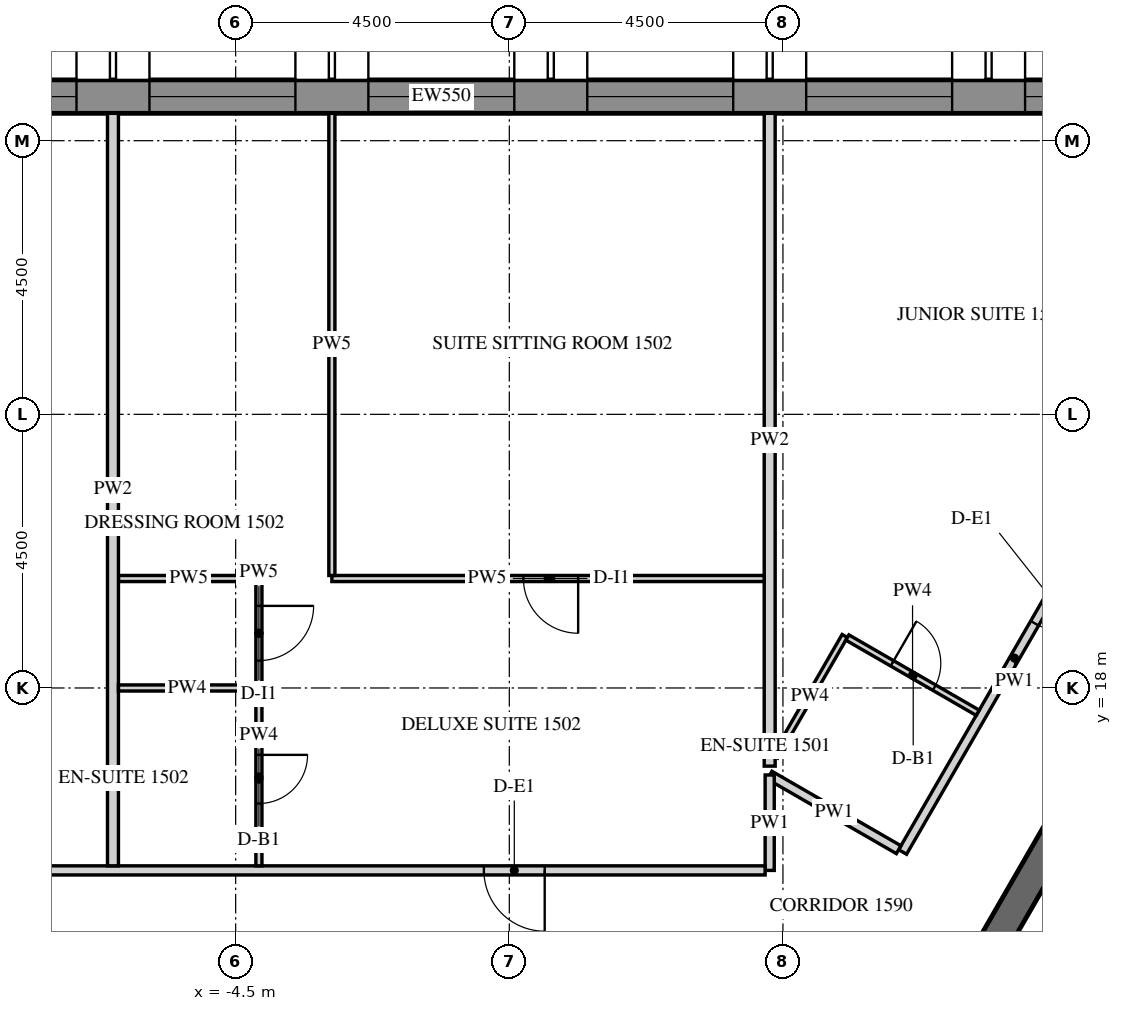
"""IFC4 building model, lengths in metres.
Left out: names, types, materials, properties, quantities, classifications, styles, units other than length and angle.
Written with IfcOpenShell. Run it as: python <this file> out.ifc"""

import sys

from ifc_helpers import new_model, si_unit, direction, frame, frame_2d, origin, place, context, subcontext, project, spatial, polyline, rectangle, outline, extrude, element, fill, save


model = new_model("IFC4")
c1 = context("Model", 3, precision=1e-05, world=origin(), true_north=direction((0.0, 1.0)))
c2 = subcontext(c1, "Body", "Model", "MODEL_VIEW")
j1 = project(units=[si_unit("LENGTHUNIT", "METRE"), si_unit("PLANEANGLEUNIT", "RADIAN")], contexts=[c1])
p1 = place(None, origin())
s1 = spatial("IfcSite", under=j1, at=p1, CompositionType="ELEMENT")
p2 = place(p1, origin())
s2 = spatial("IfcBuilding", under=s1, at=p2, CompositionType="ELEMENT")
p3 = place(p2, frame((0.0, 0.0, 195.6)))
s3 = spatial("IfcBuildingStorey", under=s2, at=p3, CompositionType="ELEMENT", Elevation=195.6)
p4 = place(p3, frame((12.761, 27.725, -0.15), z_axis=(0.0, 0.0, 1.0), x_axis=(-1.0, 0.0, 0.0)))
e1 = element("IfcWall", 1, at=p4, inside=s3, PredefinedType="SOLIDWALL", context=c2, shape_type="SweptSolid", body=[
    extrude(outline(polyline([(-0.022, -0.275), (27.783, -0.275), (27.732, 0.275), (0.022, 0.275), (-0.022, -0.275)])), origin(), (0.0, 0.0, 1.0), 3.9),
])
p5 = place(p4, frame((1.879, 0.0, 1.05)))
e2 = element("IfcOpeningElement", 2, at=p5, cuts=e1, PredefinedType="OPENING", context=c2, shape_type="SweptSolid", body=[
    extrude(rectangle(XDim=2.4, YDim=2.4, at=frame_2d((1.2, 1.2))), frame((0.0, 0.285, 0.0), z_axis=(0.0, -1.0, 0.0), x_axis=(1.0, 0.0, 0.0)), (0.0, 0.0, 1.0), 0.57),
])
p6 = place(p4, frame((5.479, 0.0, 1.05)))
e3 = element("IfcOpeningElement", 3, at=p6, cuts=e1, PredefinedType="OPENING", context=c2, shape_type="SweptSolid", body=[
    extrude(rectangle(XDim=2.4, YDim=2.4, at=frame_2d((1.2, 1.2))), frame((0.0, 0.285, 0.0), z_axis=(0.0, -1.0, 0.0), x_axis=(1.0, 0.0, 0.0)), (0.0, 0.0, 1.0), 0.57),
])
p7 = place(p4, frame((9.079, 0.0, 1.05)))
e4 = element("IfcOpeningElement", 4, at=p7, cuts=e1, PredefinedType="OPENING", context=c2, shape_type="SweptSolid", body=[
    extrude(rectangle(XDim=2.4, YDim=2.4, at=frame_2d((1.2, 1.2))), frame((0.0, 0.285, 0.0), z_axis=(0.0, -1.0, 0.0), x_axis=(1.0, 0.0, 0.0)), (0.0, 0.0, 1.0), 0.57),
])
p8 = place(p4, frame((12.679, 0.0, 1.05)))
e5 = element("IfcOpeningElement", 5, at=p8, cuts=e1, PredefinedType="OPENING", context=c2, shape_type="SweptSolid", body=[
    extrude(rectangle(XDim=2.4, YDim=2.4, at=frame_2d((1.2, 1.2))), frame((0.0, 0.285, 0.0), z_axis=(0.0, -1.0, 0.0), x_axis=(1.0, 0.0, 0.0)), (0.0, 0.0, 1.0), 0.57),
])
p9 = place(p4, frame((16.279, 0.0, 1.05)))
e6 = element("IfcOpeningElement", 6, at=p9, cuts=e1, PredefinedType="OPENING", context=c2, shape_type="SweptSolid", body=[
    extrude(rectangle(XDim=2.4, YDim=2.4, at=frame_2d((1.2, 1.2))), frame((0.0, 0.285, 0.0), z_axis=(0.0, -1.0, 0.0), x_axis=(1.0, 0.0, 0.0)), (0.0, 0.0, 1.0), 0.57),
])
p10 = place(p4, frame((19.879, 0.0, 1.05)))
e7 = element("IfcOpeningElement", 7, at=p10, cuts=e1, PredefinedType="OPENING", context=c2, shape_type="SweptSolid", body=[
    extrude(rectangle(XDim=2.4, YDim=2.4, at=frame_2d((1.2, 1.2))), frame((0.0, 0.285, 0.0), z_axis=(0.0, -1.0, 0.0), x_axis=(1.0, 0.0, 0.0)), (0.0, 0.0, 1.0), 0.57),
])
p11 = place(p4, frame((23.479, 0.0, 1.05)))
e8 = element("IfcOpeningElement", 8, at=p11, cuts=e1, PredefinedType="OPENING", context=c2, shape_type="SweptSolid", body=[
    extrude(rectangle(XDim=2.4, YDim=2.4, at=frame_2d((1.2, 1.2))), frame((0.0, 0.285, 0.0), z_axis=(0.0, -1.0, 0.0), x_axis=(1.0, 0.0, 0.0)), (0.0, 0.0, 1.0), 0.57),
])
p12 = place(p3, frame((7.506, 13.0, -0.15), z_axis=(0.0, 0.0, 1.0), x_axis=(0.499988271576, 0.866032175087, 0.0)))
e9 = element("IfcWall", 9, at=p12, inside=s3, PredefinedType="SHEAR", context=c2, shape_type="SweptSolid", body=[
    extrude(rectangle(XDim=15.424, YDim=0.5, at=frame_2d((7.712, 0.0))), origin(), (0.0, 0.0, 1.0), 3.9),
])
p13 = place(p12, frame((6.812, 0.0, 0.15)))
e10 = element("IfcOpeningElement", 10, at=p13, cuts=e9, PredefinedType="OPENING", context=c2, shape_type="SweptSolid", body=[
    extrude(rectangle(XDim=1.8, YDim=2.4, at=frame_2d((0.9, 1.2))), frame((0.0, 0.26, 0.0), z_axis=(0.0, -1.0, 0.0), x_axis=(1.0, 0.0, 0.0)), (0.0, 0.0, 1.0), 0.52),
])
p14 = place(p3, frame((10.149, 21.678, 0.0), z_axis=(0.0, 0.0, 1.0), x_axis=(-0.500020076982, -0.866013812023, 0.0)))
e11 = element("IfcWall", 11, at=p14, inside=s3, PredefinedType="PARTITIONING", context=c2, shape_type="SweptSolid", body=[
    extrude(rectangle(XDim=7.361, YDim=0.15, at=frame_2d((3.681, 0.0))), origin(), (0.0, 0.0, 1.0), 2.988),
])
p15 = place(p14, frame((2.018, 0.0, 0.0)))
e12 = element("IfcOpeningElement", 12, at=p15, cuts=e11, PredefinedType="OPENING", context=c2, shape_type="SweptSolid", body=[
    extrude(rectangle(XDim=1.0, YDim=2.1, at=frame_2d((0.5, 1.05))), frame((0.0, 0.085, 0.0), z_axis=(0.0, -1.0, 0.0), x_axis=(1.0, 0.0, 0.0)), (0.0, 0.0, 1.0), 0.17),
])
p16 = place(p3, frame((6.403, 15.341, 0.0), z_axis=(0.0, 0.0, 1.0), x_axis=(-0.8660013066, 0.500041735226, 0.0)))
e13 = element("IfcWall", 13, at=p16, inside=s3, PredefinedType="PARTITIONING", context=c2, shape_type="SweptSolid", body=[
    extrude(rectangle(XDim=2.449, YDim=0.15, at=frame_2d((1.225, 0.0))), origin(), (0.0, 0.0, 1.0), 2.988),
])
p17 = place(p3, frame((4.282, 16.569, 0.0), z_axis=(0.0, 0.0, 1.0), x_axis=(0.0, -1.0, 0.0)))
e14 = element("IfcWall", 14, at=p17, inside=s3, PredefinedType="PARTITIONING", context=c2, shape_type="SweptSolid", body=[
    extrude(rectangle(XDim=1.569, YDim=0.15, at=frame_2d((0.785, 0.0))), origin(), (0.0, 0.0, 1.0), 2.988),
])
p18 = place(p3, frame((4.207, 15.0, 0.0), z_axis=(0.0, 0.0, 1.0), x_axis=(-1.0, 0.0, 0.0)))
e15 = element("IfcWall", 15, at=p18, inside=s3, PredefinedType="PARTITIONING", context=c2, shape_type="SweptSolid", body=[
    extrude(rectangle(XDim=12.867, YDim=0.15, at=frame_2d((6.434, 0.0))), origin(), (0.0, 0.0, 1.0), 2.988),
])
p19 = place(p18, frame((3.625, 0.0, 0.0)))
e16 = element("IfcOpeningElement", 16, at=p19, cuts=e15, PredefinedType="OPENING", context=c2, shape_type="SweptSolid", body=[
    extrude(rectangle(XDim=1.0, YDim=2.1, at=frame_2d((0.5, 1.05))), frame((0.0, 0.085, 0.0), z_axis=(0.0, -1.0, 0.0), x_axis=(1.0, 0.0, 0.0)), (0.0, 0.0, 1.0), 0.17),
])
p20 = place(p3, frame((4.372, 16.873, 0.0), z_axis=(0.0, 0.0, 1.0), x_axis=(0.500005641832, 0.866022146447, 0.0)))
e17 = element("IfcWall", 17, at=p20, inside=s3, PredefinedType="PARTITIONING", context=c2, shape_type="SweptSolid", body=[
    extrude(rectangle(XDim=2.289, YDim=0.1, at=frame_2d((1.144, 0.0))), origin(), (0.0, 0.0, 1.0), 2.988),
])
p21 = place(p3, frame((5.56, 18.83, 0.0), z_axis=(0.0, 0.0, 1.0), x_axis=(0.866006523861, -0.500032699561, 0.0)))
e18 = element("IfcWall", 18, at=p21, inside=s3, PredefinedType="PARTITIONING", context=c2, shape_type="SweptSolid", body=[
    extrude(rectangle(XDim=2.475, YDim=0.1, at=frame_2d((1.237, 0.0))), origin(), (0.0, 0.0, 1.0), 2.988),
])
p22 = place(p21, frame((0.85, 0.0, 0.0)))
e19 = element("IfcOpeningElement", 19, at=p22, cuts=e18, PredefinedType="OPENING", context=c2, shape_type="SweptSolid", body=[
    extrude(rectangle(XDim=0.8, YDim=2.1, at=frame_2d((0.4, 1.05))), frame((0.0, 0.06, 0.0), z_axis=(0.0, -1.0, 0.0), x_axis=(1.0, 0.0, 0.0)), (0.0, 0.0, 1.0), 0.12),
])
p23 = place(p3, frame((4.282, 27.45, 0.0), z_axis=(0.0, 0.0, 1.0), x_axis=(0.0, -1.0, 0.0)))
e20 = element("IfcWall", 20, at=p23, inside=s3, PredefinedType="PARTITIONING", context=c2, shape_type="SweptSolid", body=[
    extrude(rectangle(XDim=10.735, YDim=0.18, at=frame_2d((5.368, 0.0))), origin(), (0.0, 0.0, 1.0), 2.988),
])
p24 = place(p3, frame((-4.118, 18.0, 0.0), z_axis=(0.0, 0.0, 1.0), x_axis=(0.0, -1.0, 0.0)))
e21 = element("IfcWall", 21, at=p24, inside=s3, PredefinedType="PARTITIONING", context=c2, shape_type="SweptSolid", body=[
    extrude(rectangle(XDim=2.925, YDim=0.1, at=frame_2d((1.462, 0.0))), origin(), (0.0, 0.0, 1.0), 2.988),
])
p25 = place(p24, frame((1.1, 0.0, 0.0)))
e22 = element("IfcOpeningElement", 22, at=p25, cuts=e21, PredefinedType="OPENING", context=c2, shape_type="SweptSolid", body=[
    extrude(rectangle(XDim=0.8, YDim=2.1, at=frame_2d((0.4, 1.05))), frame((0.0, 0.06, 0.0), z_axis=(0.0, -1.0, 0.0), x_axis=(1.0, 0.0, 0.0)), (0.0, 0.0, 1.0), 0.12),
])
p26 = place(p3, frame((-6.428, 19.8, 0.0), z_axis=(0.0, 0.0, 1.0), x_axis=(1.0, 0.0, 0.0)))
e23 = element("IfcWall", 23, at=p26, inside=s3, PredefinedType="PARTITIONING", context=c2, shape_type="SweptSolid", body=[
    extrude(rectangle(XDim=2.31, YDim=0.1, at=frame_2d((1.155, 0.0))), origin(), (0.0, 0.0, 1.0), 2.988),
])
p27 = place(p3, frame((-4.118, 19.75, 0.0), z_axis=(0.0, 0.0, 1.0), x_axis=(0.0, -1.0, 0.0)))
e24 = element("IfcWall", 24, at=p27, inside=s3, PredefinedType="PARTITIONING", context=c2, shape_type="SweptSolid", body=[
    extrude(rectangle(XDim=1.7, YDim=0.1, at=frame_2d((0.85, 0.0))), origin(), (0.0, 0.0, 1.0), 2.988),
])
p28 = place(p27, frame((0.4, 0.0, 0.0)))
e25 = element("IfcOpeningElement", 25, at=p28, cuts=e24, PredefinedType="OPENING", context=c2, shape_type="SweptSolid", body=[
    extrude(rectangle(XDim=0.9, YDim=2.1, at=frame_2d((0.45, 1.05))), frame((0.0, 0.06, 0.0), z_axis=(0.0, -1.0, 0.0), x_axis=(1.0, 0.0, 0.0)), (0.0, 0.0, 1.0), 0.12),
])
p29 = place(p3, frame((4.192, 19.8, 0.0), z_axis=(0.0, 0.0, 1.0), x_axis=(-1.0, 0.0, 0.0)))
e26 = element("IfcWall", 26, at=p29, inside=s3, PredefinedType="PARTITIONING", context=c2, shape_type="SweptSolid", body=[
    extrude(rectangle(XDim=7.11, YDim=0.1, at=frame_2d((3.555, 0.0))), origin(), (0.0, 0.0, 1.0), 2.988),
])
p30 = place(p29, frame((3.06, 0.0, 0.0)))
e27 = element("IfcOpeningElement", 27, at=p30, cuts=e26, PredefinedType="OPENING", context=c2, shape_type="SweptSolid", body=[
    extrude(rectangle(XDim=0.9, YDim=2.1, at=frame_2d((0.45, 1.05))), frame((0.0, 0.06, 0.0), z_axis=(0.0, -1.0, 0.0), x_axis=(1.0, 0.0, 0.0)), (0.0, 0.0, 1.0), 0.12),
])
p31 = place(p3, frame((-2.918, 19.85, 0.0), z_axis=(0.0, 0.0, 1.0), x_axis=(0.0, 1.0, 0.0)))
e28 = element("IfcWall", 28, at=p31, inside=s3, PredefinedType="PARTITIONING", context=c2, shape_type="SweptSolid", body=[
    extrude(rectangle(XDim=7.6, YDim=0.1, at=frame_2d((3.8, 0.0))), origin(), (0.0, 0.0, 1.0), 2.988),
])
p32 = place(p3, frame((-6.518, 27.45, 0.0), z_axis=(0.0, 0.0, 1.0), x_axis=(0.0, -1.0, 0.0)))
e29 = element("IfcWall", 29, at=p32, inside=s3, PredefinedType="PARTITIONING", context=c2, shape_type="SweptSolid", body=[
    extrude(rectangle(XDim=12.375, YDim=0.18, at=frame_2d((6.188, 0.0))), origin(), (0.0, 0.0, 1.0), 2.988),
])
p33 = place(p3, frame((-4.168, 18.0, 0.0), z_axis=(0.0, 0.0, 1.0), x_axis=(-1.0, 0.0, 0.0)))
e30 = element("IfcWall", 30, at=p33, inside=s3, PredefinedType="PARTITIONING", context=c2, shape_type="SweptSolid", body=[
    extrude(rectangle(XDim=2.26, YDim=0.1, at=frame_2d((1.13, 0.0))), origin(), (0.0, 0.0, 1.0), 2.988),
])
p34 = place(p5, frame((0.0, 0.205, 0.0)))
e31 = element("IfcWindow", 31, at=p34, inside=s3, PartitioningType="DOUBLE_PANEL_VERTICAL", PredefinedType="WINDOW", context=c2, shape_type="SweptSolid", body=[
    extrude(rectangle(XDim=2.4, YDim=2.4, at=frame_2d((1.2, 1.2))), frame((0.0, 0.03, 0.0), z_axis=(0.0, -1.0, 0.0), x_axis=(1.0, 0.0, 0.0)), (0.0, 0.0, 1.0), 0.06),
])
fill(e2, e31)
p35 = place(p6, frame((0.0, 0.205, 0.0)))
e32 = element("IfcWindow", 32, at=p35, inside=s3, PartitioningType="DOUBLE_PANEL_VERTICAL", PredefinedType="WINDOW", context=c2, shape_type="SweptSolid", body=[
    extrude(rectangle(XDim=2.4, YDim=2.4, at=frame_2d((1.2, 1.2))), frame((0.0, 0.03, 0.0), z_axis=(0.0, -1.0, 0.0), x_axis=(1.0, 0.0, 0.0)), (0.0, 0.0, 1.0), 0.06),
])
fill(e3, e32)
p36 = place(p7, frame((0.0, 0.205, 0.0)))
e33 = element("IfcWindow", 33, at=p36, inside=s3, PartitioningType="DOUBLE_PANEL_VERTICAL", PredefinedType="WINDOW", context=c2, shape_type="SweptSolid", body=[
    extrude(rectangle(XDim=2.4, YDim=2.4, at=frame_2d((1.2, 1.2))), frame((0.0, 0.03, 0.0), z_axis=(0.0, -1.0, 0.0), x_axis=(1.0, 0.0, 0.0)), (0.0, 0.0, 1.0), 0.06),
])
fill(e4, e33)
p37 = place(p8, frame((0.0, 0.205, 0.0)))
e34 = element("IfcWindow", 34, at=p37, inside=s3, PartitioningType="DOUBLE_PANEL_VERTICAL", PredefinedType="WINDOW", context=c2, shape_type="SweptSolid", body=[
    extrude(rectangle(XDim=2.4, YDim=2.4, at=frame_2d((1.2, 1.2))), frame((0.0, 0.03, 0.0), z_axis=(0.0, -1.0, 0.0), x_axis=(1.0, 0.0, 0.0)), (0.0, 0.0, 1.0), 0.06),
])
fill(e5, e34)
p38 = place(p9, frame((0.0, 0.205, 0.0)))
e35 = element("IfcWindow", 35, at=p38, inside=s3, PartitioningType="DOUBLE_PANEL_VERTICAL", PredefinedType="WINDOW", context=c2, shape_type="SweptSolid", body=[
    extrude(rectangle(XDim=2.4, YDim=2.4, at=frame_2d((1.2, 1.2))), frame((0.0, 0.03, 0.0), z_axis=(0.0, -1.0, 0.0), x_axis=(1.0, 0.0, 0.0)), (0.0, 0.0, 1.0), 0.06),
])
fill(e6, e35)
p39 = place(p10, frame((0.0, 0.205, 0.0)))
e36 = element("IfcWindow", 36, at=p39, inside=s3, PartitioningType="DOUBLE_PANEL_VERTICAL", PredefinedType="WINDOW", context=c2, shape_type="SweptSolid", body=[
    extrude(rectangle(XDim=2.4, YDim=2.4, at=frame_2d((1.2, 1.2))), frame((0.0, 0.03, 0.0), z_axis=(0.0, -1.0, 0.0), x_axis=(1.0, 0.0, 0.0)), (0.0, 0.0, 1.0), 0.06),
])
fill(e7, e36)
p40 = place(p15, origin())
e37 = element("IfcDoor", 37, at=p40, inside=s3, OperationType="SINGLE_SWING_LEFT", PredefinedType="DOOR", context=c2, shape_type="SweptSolid", body=[
    extrude(rectangle(XDim=1.0, YDim=2.1, at=frame_2d((0.5, 1.05))), frame((0.0, 0.025, 0.0), z_axis=(0.0, -1.0, 0.0), x_axis=(1.0, 0.0, 0.0)), (0.0, 0.0, 1.0), 0.05),
])
fill(e12, e37)
p41 = place(p22, origin())
e38 = element("IfcDoor", 38, at=p41, inside=s3, OperationType="SINGLE_SWING_RIGHT", PredefinedType="DOOR", context=c2, shape_type="SweptSolid", body=[
    extrude(rectangle(XDim=0.8, YDim=2.1, at=frame_2d((0.4, 1.05))), frame((0.0, 0.025, 0.0), z_axis=(0.0, -1.0, 0.0), x_axis=(1.0, 0.0, 0.0)), (0.0, 0.0, 1.0), 0.05),
])
fill(e19, e38)
p42 = place(p19, origin())
e39 = element("IfcDoor", 39, at=p42, inside=s3, OperationType="SINGLE_SWING_RIGHT", PredefinedType="DOOR", context=c2, shape_type="SweptSolid", body=[
    extrude(rectangle(XDim=1.0, YDim=2.1, at=frame_2d((0.5, 1.05))), frame((0.0, 0.025, 0.0), z_axis=(0.0, -1.0, 0.0), x_axis=(1.0, 0.0, 0.0)), (0.0, 0.0, 1.0), 0.05),
])
fill(e16, e39)
p43 = place(p25, origin())
e40 = element("IfcDoor", 40, at=p43, inside=s3, OperationType="SINGLE_SWING_LEFT", PredefinedType="DOOR", context=c2, shape_type="SweptSolid", body=[
    extrude(rectangle(XDim=0.8, YDim=2.1, at=frame_2d((0.4, 1.05))), frame((0.0, 0.025, 0.0), z_axis=(0.0, -1.0, 0.0), x_axis=(1.0, 0.0, 0.0)), (0.0, 0.0, 1.0), 0.05),
])
fill(e22, e40)
p44 = place(p28, origin())
e41 = element("IfcDoor", 41, at=p44, inside=s3, OperationType="SINGLE_SWING_LEFT", PredefinedType="DOOR", context=c2, shape_type="SweptSolid", body=[
    extrude(rectangle(XDim=0.9, YDim=2.1, at=frame_2d((0.45, 1.05))), frame((0.0, 0.025, 0.0), z_axis=(0.0, -1.0, 0.0), x_axis=(1.0, 0.0, 0.0)), (0.0, 0.0, 1.0), 0.05),
])
fill(e25, e41)
p45 = place(p30, origin())
e42 = element("IfcDoor", 42, at=p45, inside=s3, OperationType="SINGLE_SWING_RIGHT", PredefinedType="DOOR", context=c2, shape_type="SweptSolid", body=[
    extrude(rectangle(XDim=0.9, YDim=2.1, at=frame_2d((0.45, 1.05))), frame((0.0, 0.025, 0.0), z_axis=(0.0, -1.0, 0.0), x_axis=(1.0, 0.0, 0.0)), (0.0, 0.0, 1.0), 0.05),
])
fill(e27, e42)
save(model, sys.argv[1])
